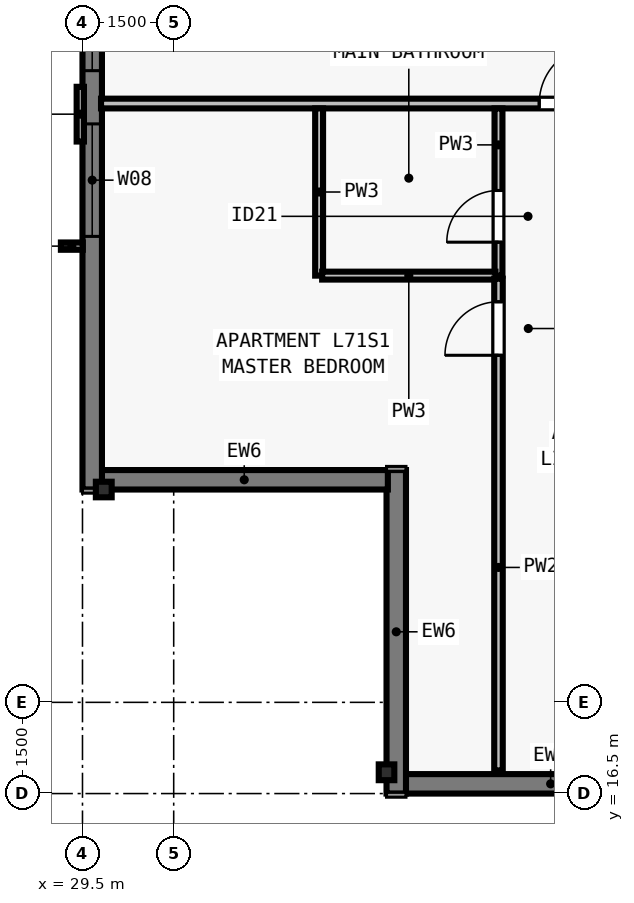
"""IFC4 building model, lengths in metres.
Left out: names, types, materials, properties, quantities, classifications, styles, units other than length and angle.
Written with IfcOpenShell. Run it as: python <this file> out.ifc"""

import sys

from ifc_helpers import new_model, si_unit, direction, frame, frame_2d, origin, origin_2d, place, context, subcontext, project, spatial, rectangle, i_section, extrude, element, fill, save


model = new_model("IFC4")
c1 = context("Model", 3, precision=1e-05, world=origin(), true_north=direction((0.0, 1.0)))
c2 = subcontext(c1, "Body", "Model", "MODEL_VIEW")
j1 = project(units=[si_unit("LENGTHUNIT", "METRE"), si_unit("PLANEANGLEUNIT", "RADIAN")], contexts=[c1])
p1 = place(None, origin())
s1 = spatial("IfcSite", under=j1, at=p1, CompositionType="ELEMENT")
p2 = place(p1, origin())
s2 = spatial("IfcBuilding", under=s1, at=p2, CompositionType="ELEMENT")
p3 = place(p2, frame((0.0, 0.0, 258.5)))
s3 = spatial("IfcBuildingStorey", under=s2, at=p3, CompositionType="ELEMENT", Elevation=258.5)
for number, where, z_axis, x_axis in (
    (1, (34.5, 16.85, 0.0), (0.0, 0.0, 1.0), (1.0, 0.0, 0.0)),
    (2, (29.85, 21.5, 0.0), (0.0, 0.0, 1.0), (0.0, 1.0, 0.0)),
):
    element("IfcColumn", number, at=place(p3, frame(where, z_axis=z_axis, x_axis=x_axis)), inside=s3, PredefinedType="COLUMN", context=c2, shape_type="SweptSolid", body=[
        extrude(i_section(OverallWidth=0.256, OverallDepth=0.26, WebThickness=0.01, FlangeThickness=0.017, FilletRadius=0.013, at=origin_2d()), origin(), (0.0, 0.0, 1.0), 3.5),
    ])
p4 = place(p3, frame((39.6, 16.66, 0.0), z_axis=(0.0, 0.0, 1.0), x_axis=(-1.0, 0.0, 0.0)))
e3 = element("IfcWall", 3, at=p4, inside=s3, PredefinedType="SOLIDWALL", context=c2, shape_type="SweptSolid", body=[
    extrude(rectangle(XDim=4.802, YDim=0.32, at=frame_2d((2.401, 0.0))), origin(), (0.0, 0.0, 1.0), 3.29),
])
p5 = place(p3, frame((34.66, 16.5, 0.0), z_axis=(0.0, 0.0, 1.0), x_axis=(0.0, 1.0, 0.0)))
e4 = element("IfcWall", 4, at=p5, inside=s3, PredefinedType="SOLIDWALL", context=c2, shape_type="SweptSolid", body=[
    extrude(rectangle(XDim=5.32, YDim=0.32, at=frame_2d((2.66, 0.0))), origin(), (0.0, 0.0, 1.0), 3.29),
])
p6 = place(p3, frame((34.522, 21.66, 0.0), z_axis=(0.0, 0.0, 1.0), x_axis=(-1.0, 0.0, 0.0)))
e5 = element("IfcWall", 5, at=p6, inside=s3, PredefinedType="SOLIDWALL", context=c2, shape_type="SweptSolid", body=[
    extrude(rectangle(XDim=4.724, YDim=0.32, at=frame_2d((2.362, 0.0))), origin(), (0.0, 0.0, 1.0), 3.29),
])
p7 = place(p3, frame((29.66, 21.5, 0.0), z_axis=(0.0, 0.0, 1.0), x_axis=(0.0, 1.0, 0.0)))
e6 = element("IfcWall", 6, at=p7, inside=s3, PredefinedType="SOLIDWALL", context=c2, shape_type="SweptSolid", body=[
    extrude(rectangle(XDim=34.702, YDim=0.32, at=frame_2d((17.351, 0.0))), origin(), (0.0, 0.0, 1.0), 3.29),
])
p8 = place(p7, frame((4.163, 0.0, 0.8)))
e7 = element("IfcOpeningElement", 7, at=p8, cuts=e6, PredefinedType="OPENING", context=c2, shape_type="SweptSolid", body=[
    extrude(rectangle(XDim=1.85, YDim=1.678, at=frame_2d((0.925, 0.839))), frame((0.0, 0.17, 0.0), z_axis=(0.0, -1.0, 0.0), x_axis=(1.0, 0.0, 0.0)), (0.0, 0.0, 1.0), 0.34),
])
p9 = place(p7, frame((6.888, 0.0, 0.8)))
e8 = element("IfcOpeningElement", 8, at=p9, cuts=e6, PredefinedType="OPENING", context=c2, shape_type="SweptSolid", body=[
    extrude(rectangle(XDim=1.55, YDim=1.678, at=frame_2d((0.775, 0.839))), frame((0.0, 0.17, 0.0), z_axis=(0.0, -1.0, 0.0), x_axis=(1.0, 0.0, 0.0)), (0.0, 0.0, 1.0), 0.34),
])
p10 = place(p7, frame((10.113, 0.0, 0.8)))
e9 = element("IfcOpeningElement", 9, at=p10, cuts=e6, PredefinedType="OPENING", context=c2, shape_type="SweptSolid", body=[
    extrude(rectangle(XDim=1.85, YDim=1.678, at=frame_2d((0.925, 0.839))), frame((0.0, 0.17, 0.0), z_axis=(0.0, -1.0, 0.0), x_axis=(1.0, 0.0, 0.0)), (0.0, 0.0, 1.0), 0.34),
])
p11 = place(p7, frame((14.888, 0.0, 0.8)))
e10 = element("IfcOpeningElement", 10, at=p11, cuts=e6, PredefinedType="OPENING", context=c2, shape_type="SweptSolid", body=[
    extrude(rectangle(XDim=1.55, YDim=1.678, at=frame_2d((0.775, 0.839))), frame((0.0, 0.17, 0.0), z_axis=(0.0, -1.0, 0.0), x_axis=(1.0, 0.0, 0.0)), (0.0, 0.0, 1.0), 0.34),
])
p12 = place(p7, frame((19.364, 0.0, 0.8)))
e11 = element("IfcOpeningElement", 11, at=p12, cuts=e6, PredefinedType="OPENING", context=c2, shape_type="SweptSolid", body=[
    extrude(rectangle(XDim=1.85, YDim=1.678, at=frame_2d((0.925, 0.839))), frame((0.0, 0.17, 0.0), z_axis=(0.0, -1.0, 0.0), x_axis=(1.0, 0.0, 0.0)), (0.0, 0.0, 1.0), 0.34),
])
p13 = place(p7, frame((23.614, 0.0, 0.8)))
e12 = element("IfcOpeningElement", 12, at=p13, cuts=e6, PredefinedType="OPENING", context=c2, shape_type="SweptSolid", body=[
    extrude(rectangle(XDim=1.85, YDim=1.678, at=frame_2d((0.925, 0.839))), frame((0.0, 0.17, 0.0), z_axis=(0.0, -1.0, 0.0), x_axis=(1.0, 0.0, 0.0)), (0.0, 0.0, 1.0), 0.34),
])
p14 = place(p7, frame((31.35, 0.0, 0.8)))
e13 = element("IfcOpeningElement", 13, at=p14, cuts=e6, PredefinedType="OPENING", context=c2, shape_type="SweptSolid", body=[
    extrude(rectangle(XDim=0.9, YDim=1.678, at=frame_2d((0.45, 0.839))), frame((0.0, 0.17, 0.0), z_axis=(0.0, -1.0, 0.0), x_axis=(1.0, 0.0, 0.0)), (0.0, 0.0, 1.0), 0.34),
])
p15 = place(p3, frame((29.805, 27.847, 0.0), z_axis=(0.0, 0.0, 1.0), x_axis=(1.0, 0.0, 0.0)))
e14 = element("IfcWall", 14, at=p15, inside=s3, PredefinedType="PARTITIONING", context=c2, shape_type="SweptSolid", body=[
    extrude(rectangle(XDim=44.39, YDim=0.16, at=frame_2d((22.195, 0.0))), origin(), (0.0, 0.0, 1.0), 2.958),
])
p16 = place(p15, frame((7.206, 0.0, 0.0)))
e15 = element("IfcOpeningElement", 15, at=p16, cuts=e14, PredefinedType="OPENING", context=c2, shape_type="SweptSolid", body=[
    extrude(rectangle(XDim=0.96, YDim=2.18, at=frame_2d((0.48, 1.09))), frame((0.0, 0.09, 0.0), z_axis=(0.0, -1.0, 0.0), x_axis=(1.0, 0.0, 0.0)), (0.0, 0.0, 1.0), 0.18),
])
p17 = place(p15, frame((21.78, 0.0, 0.0)))
e16 = element("IfcOpeningElement", 16, at=p17, cuts=e14, PredefinedType="OPENING", context=c2, shape_type="SweptSolid", body=[
    extrude(rectangle(XDim=0.96, YDim=2.18, at=frame_2d((0.48, 1.09))), frame((0.0, 0.09, 0.0), z_axis=(0.0, -1.0, 0.0), x_axis=(1.0, 0.0, 0.0)), (0.0, 0.0, 1.0), 0.18),
])
p18 = place(p15, frame((36.289, 0.0, 0.0)))
e17 = element("IfcOpeningElement", 17, at=p18, cuts=e14, PredefinedType="OPENING", context=c2, shape_type="SweptSolid", body=[
    extrude(rectangle(XDim=0.96, YDim=2.18, at=frame_2d((0.48, 1.09))), frame((0.0, 0.09, 0.0), z_axis=(0.0, -1.0, 0.0), x_axis=(1.0, 0.0, 0.0)), (0.0, 0.0, 1.0), 0.18),
])
p19 = place(p3, frame((33.391, 25.018, 0.0), z_axis=(0.0, 0.0, 1.0), x_axis=(0.0, 1.0, 0.0)))
e18 = element("IfcWall", 18, at=p19, inside=s3, PredefinedType="PLUMBINGWALL", context=c2, shape_type="SweptSolid", body=[
    extrude(rectangle(XDim=2.75, YDim=0.13, at=frame_2d((1.375, 0.0))), origin(), (0.0, 0.0, 1.0), 3.29),
])
p20 = place(p3, frame((36.341, 25.018, 0.0), z_axis=(0.0, 0.0, 1.0), x_axis=(0.0, 1.0, 0.0)))
e19 = element("IfcWall", 19, at=p20, inside=s3, PredefinedType="PLUMBINGWALL", context=c2, shape_type="SweptSolid", body=[
    extrude(rectangle(XDim=2.75, YDim=0.13, at=frame_2d((1.375, 0.0))), origin(), (0.0, 0.0, 1.0), 3.29),
])
p21 = place(p20, frame((0.55, 0.0, 0.0)))
e20 = element("IfcOpeningElement", 20, at=p21, cuts=e19, PredefinedType="OPENING", context=c2, shape_type="SweptSolid", body=[
    extrude(rectangle(XDim=0.85, YDim=2.08, at=frame_2d((0.425, 1.04))), frame((0.0, 0.075, 0.0), z_axis=(0.0, -1.0, 0.0), x_axis=(1.0, 0.0, 0.0)), (0.0, 0.0, 1.0), 0.15),
])
p22 = place(p3, frame((33.441, 25.018, 0.0), z_axis=(0.0, 0.0, 1.0), x_axis=(1.0, 0.0, 0.0)))
e21 = element("IfcWall", 21, at=p22, inside=s3, PredefinedType="PLUMBINGWALL", context=c2, shape_type="SweptSolid", body=[
    extrude(rectangle(XDim=2.85, YDim=0.13, at=frame_2d((1.425, 0.0))), origin(), (0.0, 0.0, 1.0), 2.958),
])
p23 = place(p3, frame((36.341, 16.88, 0.0), z_axis=(0.0, 0.0, 1.0), x_axis=(0.0, 1.0, 0.0)))
e22 = element("IfcWall", 22, at=p23, inside=s3, PredefinedType="PARTITIONING", context=c2, shape_type="SweptSolid", body=[
    extrude(rectangle(XDim=8.088, YDim=0.14, at=frame_2d((4.044, 0.0))), origin(), (0.0, 0.0, 1.0), 2.573),
])
p24 = place(p23, frame((6.827, 0.0, 0.0)))
e23 = element("IfcOpeningElement", 23, at=p24, cuts=e22, PredefinedType="OPENING", context=c2, shape_type="SweptSolid", body=[
    extrude(rectangle(XDim=0.88, YDim=2.1, at=frame_2d((0.44, 1.05))), frame((0.0, 0.08, 0.0), z_axis=(0.0, -1.0, 0.0), x_axis=(1.0, 0.0, 0.0)), (0.0, 0.0, 1.0), 0.16),
])
p25 = place(p8, origin())
e24 = element("IfcWindow", 24, at=p25, inside=s3, PartitioningType="SINGLE_PANEL", PredefinedType="WINDOW", context=c2, shape_type="SweptSolid", body=[
    extrude(rectangle(XDim=1.85, YDim=1.678, at=frame_2d((0.925, 0.839))), frame((0.0, -0.05, 0.0), z_axis=(0.0, -1.0, 0.0), x_axis=(1.0, 0.0, 0.0)), (0.0, 0.0, 1.0), 0.06),
])
fill(e7, e24)
p26 = place(p9, origin())
e25 = element("IfcWindow", 25, at=p26, inside=s3, PartitioningType="SINGLE_PANEL", PredefinedType="WINDOW", context=c2, shape_type="SweptSolid", body=[
    extrude(rectangle(XDim=1.55, YDim=1.678, at=frame_2d((0.775, 0.839))), frame((0.0, -0.05, 0.0), z_axis=(0.0, -1.0, 0.0), x_axis=(1.0, 0.0, 0.0)), (0.0, 0.0, 1.0), 0.06),
])
fill(e8, e25)
p27 = place(p21, origin())
e26 = element("IfcDoor", 26, at=p27, inside=s3, OperationType="SINGLE_SWING_LEFT", PredefinedType="DOOR", context=c2, shape_type="SweptSolid", body=[
    extrude(rectangle(XDim=0.85, YDim=2.08, at=frame_2d((0.425, 1.04))), frame((0.0, 0.025, 0.0), z_axis=(0.0, -1.0, 0.0), x_axis=(1.0, 0.0, 0.0)), (0.0, 0.0, 1.0), 0.05),
])
fill(e20, e26)
p28 = place(p24, origin())
e27 = element("IfcDoor", 27, at=p28, inside=s3, OperationType="SINGLE_SWING_LEFT", PredefinedType="DOOR", context=c2, shape_type="SweptSolid", body=[
    extrude(rectangle(XDim=0.88, YDim=2.1, at=frame_2d((0.44, 1.05))), frame((0.0, 0.025, 0.0), z_axis=(0.0, -1.0, 0.0), x_axis=(1.0, 0.0, 0.0)), (0.0, 0.0, 1.0), 0.05),
])
fill(e23, e27)
p29 = place(p16, origin())
e28 = element("IfcDoor", 28, at=p29, inside=s3, OperationType="SINGLE_SWING_RIGHT", PredefinedType="DOOR", context=c2, shape_type="SweptSolid", body=[
    extrude(rectangle(XDim=0.96, YDim=2.18, at=frame_2d((0.48, 1.09))), frame((0.0, 0.025, 0.0), z_axis=(0.0, -1.0, 0.0), x_axis=(1.0, 0.0, 0.0)), (0.0, 0.0, 1.0), 0.05),
])
fill(e15, e28)
save(model, sys.argv[1])
